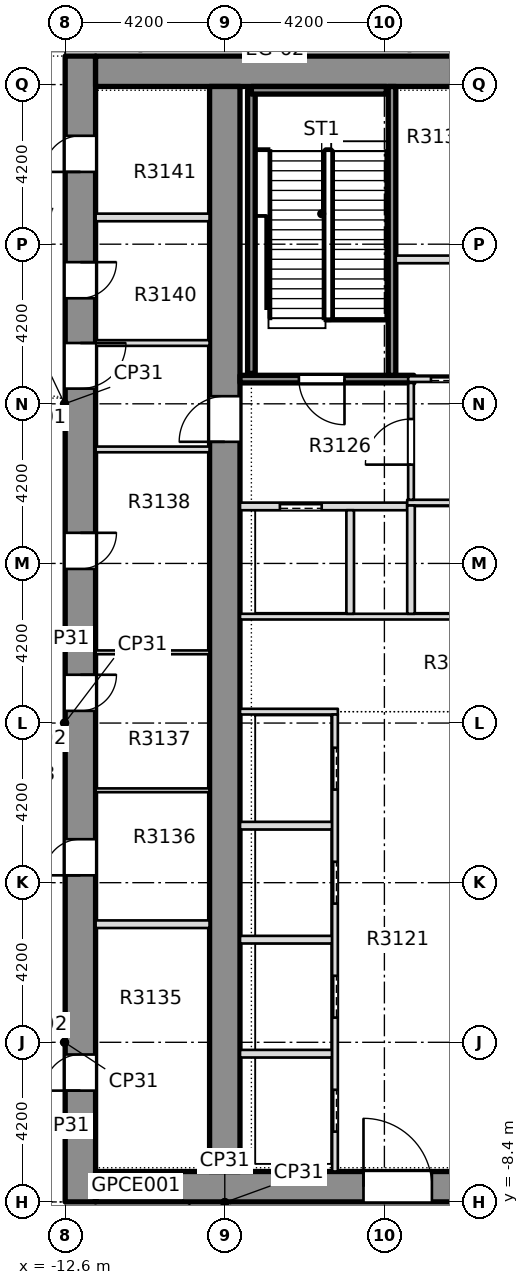
"""IFC4 building model, lengths in metres.
Left out: names, types, materials, properties, quantities, classifications, styles, units other than length and angle.
Written with IfcOpenShell. Run it as: python <this file> out.ifc"""

import sys

from ifc_helpers import new_model, si_unit, direction, frame, frame_2d, origin, place, context, subcontext, project, spatial, rectangle, extrude, element, fill, save


model = new_model("IFC4")
c1 = context("Model", 3, precision=1e-05, world=origin(), true_north=direction((0.0, 1.0)))
c2 = subcontext(c1, "Body", "Model", "MODEL_VIEW")
j1 = project(units=[si_unit("LENGTHUNIT", "METRE"), si_unit("PLANEANGLEUNIT", "RADIAN")], contexts=[c1])
p1 = place(None, origin())
s1 = spatial("IfcSite", under=j1, at=p1, CompositionType="ELEMENT")
p2 = place(p1, origin())
s2 = spatial("IfcBuilding", under=s1, at=p2, CompositionType="ELEMENT")
p3 = place(p2, frame((0.0, 0.0, 121.8)))
s3 = spatial("IfcBuildingStorey", under=s2, at=p3, CompositionType="ELEMENT", Elevation=121.8)
p4 = place(p3, frame((-12.2, -8.4, 0.0), z_axis=(0.0, 0.0, 1.0), x_axis=(0.0, 1.0, 0.0)))
e1 = element("IfcWall", 1, at=p4, inside=s3, PredefinedType="SHEAR", context=c2, shape_type="SweptSolid", body=[
    extrude(rectangle(XDim=30.15, YDim=0.8, at=frame_2d((15.075, 0.0))), origin(), (0.0, 0.0, 1.0), 6.1),
])
p5 = place(p4, frame((2.928, 0.0, 0.0)))
e2 = element("IfcOpeningElement", 2, at=p5, cuts=e1, PredefinedType="OPENING", context=c2, shape_type="SweptSolid", body=[
    extrude(rectangle(XDim=0.95, YDim=2.1, at=frame_2d((0.475, 1.05))), frame((0.0, 0.41, 0.0), z_axis=(0.0, -1.0, 0.0), x_axis=(1.0, 0.0, 0.0)), (0.0, 0.0, 1.0), 0.82),
])
p6 = place(p4, frame((8.594, 0.0, 0.0)))
e3 = element("IfcOpeningElement", 3, at=p6, cuts=e1, PredefinedType="OPENING", context=c2, shape_type="SweptSolid", body=[
    extrude(rectangle(XDim=0.95, YDim=2.1, at=frame_2d((0.475, 1.05))), frame((0.0, 0.41, 0.0), z_axis=(0.0, -1.0, 0.0), x_axis=(1.0, 0.0, 0.0)), (0.0, 0.0, 1.0), 0.82),
])
p7 = place(p4, frame((12.921, 0.0, 0.0)))
e4 = element("IfcOpeningElement", 4, at=p7, cuts=e1, PredefinedType="OPENING", context=c2, shape_type="SweptSolid", body=[
    extrude(rectangle(XDim=0.95, YDim=2.1, at=frame_2d((0.475, 1.05))), frame((0.0, 0.41, 0.0), z_axis=(0.0, -1.0, 0.0), x_axis=(1.0, 0.0, 0.0)), (0.0, 0.0, 1.0), 0.82),
])
p8 = place(p4, frame((16.656, 0.0, 0.0)))
e5 = element("IfcOpeningElement", 5, at=p8, cuts=e1, PredefinedType="OPENING", context=c2, shape_type="SweptSolid", body=[
    extrude(rectangle(XDim=0.95, YDim=2.1, at=frame_2d((0.475, 1.05))), frame((0.0, 0.41, 0.0), z_axis=(0.0, -1.0, 0.0), x_axis=(1.0, 0.0, 0.0)), (0.0, 0.0, 1.0), 0.82),
])
p9 = place(p4, frame((23.777, 0.0, 0.0)))
e6 = element("IfcOpeningElement", 6, at=p9, cuts=e1, PredefinedType="OPENING", context=c2, shape_type="SweptSolid", body=[
    extrude(rectangle(XDim=0.95, YDim=2.1, at=frame_2d((0.475, 1.05))), frame((0.0, 0.41, 0.0), z_axis=(0.0, -1.0, 0.0), x_axis=(1.0, 0.0, 0.0)), (0.0, 0.0, 1.0), 0.82),
])
p10 = place(p4, frame((27.102, 0.0, 0.0)))
e7 = element("IfcOpeningElement", 7, at=p10, cuts=e1, PredefinedType="OPENING", context=c2, shape_type="SweptSolid", body=[
    extrude(rectangle(XDim=0.95, YDim=2.1, at=frame_2d((0.475, 1.05))), frame((0.0, 0.41, 0.0), z_axis=(0.0, -1.0, 0.0), x_axis=(1.0, 0.0, 0.0)), (0.0, 0.0, 1.0), 0.82),
])
p11 = place(p4, frame((21.4, 0.0, 0.0)))
e8 = element("IfcOpeningElement", 8, at=p11, cuts=e1, PredefinedType="OPENING", context=c2, shape_type="SweptSolid", body=[
    extrude(rectangle(XDim=1.2, YDim=2.1, at=frame_2d((0.6, 1.05))), frame((0.0, 0.41, 0.0), z_axis=(0.0, -1.0, 0.0), x_axis=(1.0, 0.0, 0.0)), (0.0, 0.0, 1.0), 0.82),
])
p12 = place(p3, frame((-11.8, -8.0, 0.0), z_axis=(0.0, 0.0, 1.0), x_axis=(1.0, 0.0, 0.0)))
e9 = element("IfcWall", 9, at=p12, inside=s3, PredefinedType="SHEAR", context=c2, shape_type="SweptSolid", body=[
    extrude(rectangle(XDim=23.6, YDim=0.8, at=frame_2d((11.8, 0.0))), origin(), (0.0, 0.0, 1.0), 6.1),
])
p13 = place(p12, frame((7.05, 0.0, 0.0)))
e10 = element("IfcOpeningElement", 10, at=p13, cuts=e9, PredefinedType="OPENING", context=c2, shape_type="SweptSolid", body=[
    extrude(rectangle(XDim=1.8, YDim=2.1, at=frame_2d((0.9, 1.05))), frame((0.0, 0.41, 0.0), z_axis=(0.0, -1.0, 0.0), x_axis=(1.0, 0.0, 0.0)), (0.0, 0.0, 1.0), 0.82),
])
p14 = place(p12, frame((14.75, 0.0, 0.0)))
e11 = element("IfcOpeningElement", 11, at=p14, cuts=e9, PredefinedType="OPENING", context=c2, shape_type="SweptSolid", body=[
    extrude(rectangle(XDim=1.8, YDim=2.1, at=frame_2d((0.9, 1.05))), frame((0.0, 0.41, 0.0), z_axis=(0.0, -1.0, 0.0), x_axis=(1.0, 0.0, 0.0)), (0.0, 0.0, 1.0), 0.82),
])
p15 = place(p3, frame((-11.8, 21.35, 0.0), z_axis=(0.0, 0.0, 1.0), x_axis=(1.0, 0.0, 0.0)))
e12 = element("IfcWall", 12, at=p15, inside=s3, PredefinedType="SHEAR", context=c2, shape_type="SweptSolid", body=[
    extrude(rectangle(XDim=23.6, YDim=0.8, at=frame_2d((11.8, 0.0))), origin(), (0.0, 0.0, 1.0), 6.1),
])
p16 = place(p3, frame((-8.4, -7.6, 0.0), z_axis=(0.0, 0.0, 1.0), x_axis=(0.0, 1.0, 0.0)))
e13 = element("IfcWall", 13, at=p16, inside=s3, PredefinedType="SHEAR", context=c2, shape_type="SweptSolid", body=[
    extrude(rectangle(XDim=28.55, YDim=0.8, at=frame_2d((14.275, 0.0))), origin(), (0.0, 0.0, 1.0), 6.1),
])
p17 = place(p16, frame((19.2, 0.0, 0.0)))
e14 = element("IfcOpeningElement", 14, at=p17, cuts=e13, PredefinedType="OPENING", context=c2, shape_type="SweptSolid", body=[
    extrude(rectangle(XDim=1.2, YDim=2.1, at=frame_2d((0.6, 1.05))), frame((0.0, 0.41, 0.0), z_axis=(0.0, -1.0, 0.0), x_axis=(1.0, 0.0, 0.0)), (0.0, 0.0, 1.0), 0.82),
])
for number, where, z_axis, x_axis in (
    (15, (-7.999, -4.5, 0.0), (0.0, 0.0, 1.0), (1.0, 0.0, 0.0)),
    (16, (-7.999, -1.5, 0.0), (0.0, 0.0, 1.0), (1.0, 0.0, 0.0)),
    (17, (-7.999, 1.5, 0.0), (0.0, 0.0, 1.0), (1.0, 0.0, 0.0)),
):
    element("IfcWall", number, at=place(p3, frame(where, z_axis=z_axis, x_axis=x_axis)), inside=s3, PredefinedType="PARTITIONING", context=c2, shape_type="SweptSolid", body=[
        extrude(rectangle(XDim=2.424, YDim=0.2, at=frame_2d((1.212, 0.0))), origin(), (0.0, 0.0, 1.0), 6.1),
    ])
p18 = place(p3, frame((-7.999, 4.5, 0.0), z_axis=(0.0, 0.0, 1.0), x_axis=(1.0, 0.0, 0.0)))
e18 = element("IfcWall", 18, at=p18, inside=s3, PredefinedType="PARTITIONING", context=c2, shape_type="SweptSolid", body=[
    extrude(rectangle(XDim=2.574, YDim=0.15, at=frame_2d((1.287, 0.0))), origin(), (0.0, 0.0, 1.0), 6.1),
])
p19 = place(p3, frame((-7.999, 7.0, 0.0), z_axis=(0.0, 0.0, 1.0), x_axis=(1.0, 0.0, 0.0)))
e19 = element("IfcWall", 19, at=p19, inside=s3, PredefinedType="PARTITIONING", context=c2, shape_type="SweptSolid", body=[
    extrude(rectangle(XDim=15.998, YDim=0.15, at=frame_2d((7.999, 0.0))), origin(), (0.0, 0.0, 1.0), 6.1),
])
p20 = place(p19, frame((7.299, 0.0, 0.0)))
e20 = element("IfcOpeningElement", 20, at=p20, cuts=e19, PredefinedType="OPENING", context=c2, shape_type="SweptSolid", body=[
    extrude(rectangle(XDim=1.4, YDim=2.1, at=frame_2d((0.7, 1.05))), frame((0.0, 0.085, 0.0), z_axis=(0.0, -1.0, 0.0), x_axis=(1.0, 0.0, 0.0)), (0.0, 0.0, 1.0), 0.17),
])
p21 = place(p3, frame((-7.999, 9.9, 0.0), z_axis=(0.0, 0.0, 1.0), x_axis=(1.0, 0.0, 0.0)))
e21 = element("IfcWall", 21, at=p21, inside=s3, PredefinedType="PARTITIONING", context=c2, shape_type="SweptSolid", body=[
    extrude(rectangle(XDim=4.399, YDim=0.2, at=frame_2d((2.199, 0.0))), origin(), (0.0, 0.0, 1.0), 6.1),
])
p22 = place(p21, frame((1.049, 0.0, 0.0)))
e22 = element("IfcOpeningElement", 22, at=p22, cuts=e21, PredefinedType="OPENING", context=c2, shape_type="SweptSolid", body=[
    extrude(rectangle(XDim=1.1, YDim=2.1, at=frame_2d((0.55, 1.05))), frame((0.0, 0.11, 0.0), z_axis=(0.0, -1.0, 0.0), x_axis=(1.0, 0.0, 0.0)), (0.0, 0.0, 1.0), 0.22),
])
p23 = place(p3, frame((-3.6, 10.0, 0.0), z_axis=(0.0, 0.0, 1.0), x_axis=(1.0, 0.0, 0.0)))
e23 = element("IfcWall", 23, at=p23, inside=s3, PredefinedType="PARTITIONING", context=c2, shape_type="SweptSolid", body=[
    extrude(rectangle(XDim=7.2, YDim=0.15, at=frame_2d((3.6, 0.0))), origin(), (0.0, 0.0, 1.0), 6.1),
])
p24 = place(p23, frame((2.9, 0.0, 0.0)))
e24 = element("IfcOpeningElement", 24, at=p24, cuts=e23, PredefinedType="OPENING", context=c2, shape_type="SweptSolid", body=[
    extrude(rectangle(XDim=1.4, YDim=2.1, at=frame_2d((0.7, 1.05))), frame((0.0, 0.085, 0.0), z_axis=(0.0, -1.0, 0.0), x_axis=(1.0, 0.0, 0.0)), (0.0, 0.0, 1.0), 0.17),
])
p25 = place(p3, frame((-7.999, 13.25, 0.0), z_axis=(0.0, 0.0, 1.0), x_axis=(1.0, 0.0, 0.0)))
e25 = element("IfcWall", 25, at=p25, inside=s3, PredefinedType="SOLIDWALL", context=c2, shape_type="SweptSolid", body=[
    extrude(rectangle(XDim=4.574, YDim=0.2, at=frame_2d((2.287, 0.0))), origin(), (0.0, 0.0, 1.0), 6.1),
])
p26 = place(p25, frame((1.549, 0.0, 0.0)))
e26 = element("IfcOpeningElement", 26, at=p26, cuts=e25, PredefinedType="OPENING", context=c2, shape_type="SweptSolid", body=[
    extrude(rectangle(XDim=1.2, YDim=2.1, at=frame_2d((0.6, 1.05))), frame((0.0, 0.11, 0.0), z_axis=(0.0, -1.0, 0.0), x_axis=(1.0, 0.0, 0.0)), (0.0, 0.0, 1.0), 0.22),
])
p27 = place(p3, frame((-3.575, 13.25, 0.0), z_axis=(0.0, 0.0, 1.0), x_axis=(1.0, 0.0, 0.0)))
e27 = element("IfcWall", 27, at=p27, inside=s3, PredefinedType="PARTITIONING", context=c2, shape_type="SweptSolid", body=[
    extrude(rectangle(XDim=7.15, YDim=0.15, at=frame_2d((3.575, 0.0))), origin(), (0.0, 0.0, 1.0), 6.1),
])
p28 = place(p27, frame((0.6, 0.0, 0.0)))
e28 = element("IfcOpeningElement", 28, at=p28, cuts=e27, PredefinedType="OPENING", context=c2, shape_type="SweptSolid", body=[
    extrude(rectangle(XDim=1.2, YDim=2.1, at=frame_2d((0.6, 1.05))), frame((0.0, 0.085, 0.0), z_axis=(0.0, -1.0, 0.0), x_axis=(1.0, 0.0, 0.0)), (0.0, 0.0, 1.0), 0.17),
])
p29 = place(p27, frame((5.4, 0.0, 0.0)))
e29 = element("IfcOpeningElement", 29, at=p29, cuts=e27, PredefinedType="OPENING", context=c2, shape_type="SweptSolid", body=[
    extrude(rectangle(XDim=1.1, YDim=2.1, at=frame_2d((0.55, 1.05))), frame((0.0, 0.085, 0.0), z_axis=(0.0, -1.0, 0.0), x_axis=(1.0, 0.0, 0.0)), (0.0, 0.0, 1.0), 0.17),
])
p30 = place(p27, frame((2.975, 0.0, 0.0)))
e30 = element("IfcOpeningElement", 30, at=p30, cuts=e27, PredefinedType="OPENING", context=c2, shape_type="SweptSolid", body=[
    extrude(rectangle(XDim=1.2, YDim=2.1, at=frame_2d((0.6, 1.05))), frame((0.0, 0.085, 0.0), z_axis=(0.0, -1.0, 0.0), x_axis=(1.0, 0.0, 0.0)), (0.0, 0.0, 1.0), 0.17),
])
p31 = place(p3, frame((-3.9, 16.4, 0.0), z_axis=(0.0, 0.0, 1.0), x_axis=(1.0, 0.0, 0.0)))
e31 = element("IfcWall", 31, at=p31, inside=s3, PredefinedType="PARTITIONING", context=c2, shape_type="SweptSolid", body=[
    extrude(rectangle(XDim=3.05, YDim=0.2, at=frame_2d((1.525, 0.0))), origin(), (0.0, 0.0, 1.0), 6.1),
])
p32 = place(p3, frame((-5.5, -7.599, 0.0), z_axis=(0.0, 0.0, 1.0), x_axis=(0.0, 1.0, 0.0)))
e32 = element("IfcWall", 32, at=p32, inside=s3, PredefinedType="PARTITIONING", context=c2, shape_type="SweptSolid", body=[
    extrude(rectangle(XDim=12.024, YDim=0.15, at=frame_2d((6.012, 0.0))), origin(), (0.0, 0.0, 1.0), 6.1),
])
p33 = place(p32, frame((1.049, 0.0, 0.0)))
e33 = element("IfcOpeningElement", 33, at=p33, cuts=e32, PredefinedType="OPENING", context=c2, shape_type="SweptSolid", body=[
    extrude(rectangle(XDim=1.1, YDim=2.1, at=frame_2d((0.55, 1.05))), frame((0.0, 0.085, 0.0), z_axis=(0.0, -1.0, 0.0), x_axis=(1.0, 0.0, 0.0)), (0.0, 0.0, 1.0), 0.17),
])
p34 = place(p32, frame((4.049, 0.0, 0.0)))
e34 = element("IfcOpeningElement", 34, at=p34, cuts=e32, PredefinedType="OPENING", context=c2, shape_type="SweptSolid", body=[
    extrude(rectangle(XDim=1.1, YDim=2.1, at=frame_2d((0.55, 1.05))), frame((0.0, 0.085, 0.0), z_axis=(0.0, -1.0, 0.0), x_axis=(1.0, 0.0, 0.0)), (0.0, 0.0, 1.0), 0.17),
])
p35 = place(p32, frame((7.049, 0.0, 0.0)))
e35 = element("IfcOpeningElement", 35, at=p35, cuts=e32, PredefinedType="OPENING", context=c2, shape_type="SweptSolid", body=[
    extrude(rectangle(XDim=1.1, YDim=2.1, at=frame_2d((0.55, 1.05))), frame((0.0, 0.085, 0.0), z_axis=(0.0, -1.0, 0.0), x_axis=(1.0, 0.0, 0.0)), (0.0, 0.0, 1.0), 0.17),
])
p36 = place(p32, frame((10.049, 0.0, 0.0)))
e36 = element("IfcOpeningElement", 36, at=p36, cuts=e32, PredefinedType="OPENING", context=c2, shape_type="SweptSolid", body=[
    extrude(rectangle(XDim=1.1, YDim=2.1, at=frame_2d((0.55, 1.05))), frame((0.0, 0.085, 0.0), z_axis=(0.0, -1.0, 0.0), x_axis=(1.0, 0.0, 0.0)), (0.0, 0.0, 1.0), 0.17),
])
p37 = place(p3, frame((-5.1, 7.075, 0.0), z_axis=(0.0, 0.0, 1.0), x_axis=(0.0, 1.0, 0.0)))
e37 = element("IfcWall", 37, at=p37, inside=s3, PredefinedType="PARTITIONING", context=c2, shape_type="SweptSolid", body=[
    extrude(rectangle(XDim=2.725, YDim=0.2, at=frame_2d((1.363, 0.0))), origin(), (0.0, 0.0, 1.0), 6.1),
])
p38 = place(p3, frame((-4.0, 13.35, 0.0), z_axis=(0.0, 0.0, 1.0), x_axis=(0.0, 1.0, 0.0)))
e38 = element("IfcWall", 38, at=p38, inside=s3, PredefinedType="SOLIDWALL", context=c2, shape_type="SweptSolid", body=[
    extrude(rectangle(XDim=7.599, YDim=0.2, at=frame_2d((3.799, 0.0))), origin(), (0.0, 0.0, 1.0), 6.1),
])
p39 = place(p3, frame((-3.5, 7.075, 0.0), z_axis=(0.0, 0.0, 1.0), x_axis=(0.0, 1.0, 0.0)))
e39 = element("IfcWall", 39, at=p39, inside=s3, PredefinedType="PARTITIONING", context=c2, shape_type="SweptSolid", body=[
    extrude(rectangle(XDim=2.85, YDim=0.2, at=frame_2d((1.425, 0.0))), origin(), (0.0, 0.0, 1.0), 6.1),
])
p40 = place(p3, frame((-3.5, 10.075, 0.0), z_axis=(0.0, 0.0, 1.0), x_axis=(0.0, 1.0, 0.0)))
e40 = element("IfcWall", 40, at=p40, inside=s3, PredefinedType="PARTITIONING", context=c2, shape_type="SweptSolid", body=[
    extrude(rectangle(XDim=3.075, YDim=0.15, at=frame_2d((1.538, 0.0))), origin(), (0.0, 0.0, 1.0), 6.1),
])
p41 = place(p40, frame((0.925, 0.0, 0.0)))
e41 = element("IfcOpeningElement", 41, at=p41, cuts=e40, PredefinedType="OPENING", context=c2, shape_type="SweptSolid", body=[
    extrude(rectangle(XDim=1.2, YDim=2.1, at=frame_2d((0.6, 1.05))), frame((0.0, 0.085, 0.0), z_axis=(0.0, -1.0, 0.0), x_axis=(1.0, 0.0, 0.0)), (0.0, 0.0, 1.0), 0.17),
])
p42 = place(p3, frame((-11.799, -1.093, 0.0), z_axis=(0.0, 0.0, 1.0), x_axis=(1.0, 0.0, 0.0)))
e42 = element("IfcWall", 42, at=p42, inside=s3, PredefinedType="PARTITIONING", context=c2, shape_type="SweptSolid", body=[
    extrude(rectangle(XDim=2.998, YDim=0.2, at=frame_2d((1.499, 0.0))), origin(), (0.0, 0.0, 1.0), 6.1),
])
for number, where, z_axis, x_axis in (
    (43, (-11.799, 2.431, 0.0), (0.0, 0.0, 1.0), (1.0, 0.0, 0.0)),
    (44, (-11.799, 6.061, 0.0), (0.0, 0.0, 1.0), (1.0, 0.0, 0.0)),
):
    element("IfcWall", number, at=place(p3, frame(where, z_axis=z_axis, x_axis=x_axis)), inside=s3, PredefinedType="PARTITIONING", context=c2, shape_type="SweptSolid", body=[
        extrude(rectangle(XDim=2.998, YDim=0.1, at=frame_2d((1.499, 0.0))), origin(), (0.0, 0.0, 1.0), 6.1),
    ])
for number, where, z_axis, x_axis in (
    (45, (-11.799, 11.4, 0.0), (0.0, 0.0, 1.0), (1.0, 0.0, 0.0)),
    (46, (-11.799, 14.2, 0.0), (0.0, 0.0, 1.0), (1.0, 0.0, 0.0)),
):
    element("IfcWall", number, at=place(p3, frame(where, z_axis=z_axis, x_axis=x_axis)), inside=s3, PredefinedType="PARTITIONING", context=c2, shape_type="SweptSolid", body=[
        extrude(rectangle(XDim=2.998, YDim=0.15, at=frame_2d((1.499, 0.0))), origin(), (0.0, 0.0, 1.0), 6.1),
    ])
p43 = place(p3, frame((-11.799, 17.504, 0.0), z_axis=(0.0, 0.0, 1.0), x_axis=(1.0, 0.0, 0.0)))
e47 = element("IfcWall", 47, at=p43, inside=s3, PredefinedType="PARTITIONING", context=c2, shape_type="SweptSolid", body=[
    extrude(rectangle(XDim=2.998, YDim=0.2, at=frame_2d((1.499, 0.0))), origin(), (0.0, 0.0, 1.0), 6.1),
])
p44 = place(p3, frame((-7.7, 13.4, 0.0), z_axis=(0.0, 0.0, 1.0), x_axis=(0.0, 1.0, 0.0)))
e48 = element("IfcWall", 48, at=p44, inside=s3, PredefinedType="SOLIDWALL", context=c2, shape_type="SweptSolid", body=[
    extrude(rectangle(XDim=7.45, YDim=0.2, at=frame_2d((3.725, 0.0))), origin(), (0.0, 0.0, 1.0), 6.1),
])
p45 = place(p3, frame((-7.7, 20.85, 0.0), z_axis=(0.0, 0.0, 1.0), x_axis=(1.0, 0.0, 0.0)))
e49 = element("IfcWall", 49, at=p45, inside=s3, PredefinedType="SOLIDWALL", context=c2, shape_type="SweptSolid", body=[
    extrude(rectangle(XDim=3.55, YDim=0.2, at=frame_2d((1.775, 0.0))), origin(), (0.0, 0.0, 1.0), 6.1),
])
p46 = place(p33, origin())
e50 = element("IfcDoor", 50, at=p46, inside=s3, OperationType="SLIDING_TO_LEFT", PredefinedType="DOOR", context=c2, shape_type="SweptSolid", body=[
    extrude(rectangle(XDim=1.1, YDim=2.1, at=frame_2d((0.55, 1.05))), frame((0.0, 0.025, 0.0), z_axis=(0.0, -1.0, 0.0), x_axis=(1.0, 0.0, 0.0)), (0.0, 0.0, 1.0), 0.05),
])
fill(e33, e50)
p47 = place(p34, origin())
e51 = element("IfcDoor", 51, at=p47, inside=s3, OperationType="SLIDING_TO_LEFT", PredefinedType="DOOR", context=c2, shape_type="SweptSolid", body=[
    extrude(rectangle(XDim=1.1, YDim=2.1, at=frame_2d((0.55, 1.05))), frame((0.0, 0.025, 0.0), z_axis=(0.0, -1.0, 0.0), x_axis=(1.0, 0.0, 0.0)), (0.0, 0.0, 1.0), 0.05),
])
fill(e34, e51)
p48 = place(p35, origin())
e52 = element("IfcDoor", 52, at=p48, inside=s3, OperationType="SLIDING_TO_LEFT", PredefinedType="DOOR", context=c2, shape_type="SweptSolid", body=[
    extrude(rectangle(XDim=1.1, YDim=2.1, at=frame_2d((0.55, 1.05))), frame((0.0, 0.025, 0.0), z_axis=(0.0, -1.0, 0.0), x_axis=(1.0, 0.0, 0.0)), (0.0, 0.0, 1.0), 0.05),
])
fill(e35, e52)
p49 = place(p36, origin())
e53 = element("IfcDoor", 53, at=p49, inside=s3, OperationType="SLIDING_TO_LEFT", PredefinedType="DOOR", context=c2, shape_type="SweptSolid", body=[
    extrude(rectangle(XDim=1.1, YDim=2.1, at=frame_2d((0.55, 1.05))), frame((0.0, 0.025, 0.0), z_axis=(0.0, -1.0, 0.0), x_axis=(1.0, 0.0, 0.0)), (0.0, 0.0, 1.0), 0.05),
])
fill(e36, e53)
p50 = place(p26, origin())
e54 = element("IfcDoor", 54, at=p50, inside=s3, OperationType="SINGLE_SWING_LEFT", PredefinedType="DOOR", context=c2, shape_type="SweptSolid", body=[
    extrude(rectangle(XDim=1.2, YDim=2.1, at=frame_2d((0.6, 1.05))), frame((0.0, 0.025, 0.0), z_axis=(0.0, -1.0, 0.0), x_axis=(1.0, 0.0, 0.0)), (0.0, 0.0, 1.0), 0.05),
])
fill(e26, e54)
p51 = place(p22, origin())
e55 = element("IfcDoor", 55, at=p51, inside=s3, OperationType="SLIDING_TO_LEFT", PredefinedType="DOOR", context=c2, shape_type="SweptSolid", body=[
    extrude(rectangle(XDim=1.1, YDim=2.1, at=frame_2d((0.55, 1.05))), frame((0.0, 0.025, 0.0), z_axis=(0.0, -1.0, 0.0), x_axis=(1.0, 0.0, 0.0)), (0.0, 0.0, 1.0), 0.05),
])
fill(e22, e55)
p52 = place(p28, origin())
e56 = element("IfcDoor", 56, at=p52, inside=s3, OperationType="SLIDING_TO_RIGHT", PredefinedType="DOOR", context=c2, shape_type="SweptSolid", body=[
    extrude(rectangle(XDim=1.2, YDim=2.1, at=frame_2d((0.6, 1.05))), frame((0.0, 0.025, 0.0), z_axis=(0.0, -1.0, 0.0), x_axis=(1.0, 0.0, 0.0)), (0.0, 0.0, 1.0), 0.05),
])
fill(e28, e56)
p53 = place(p41, origin())
e57 = element("IfcDoor", 57, at=p53, inside=s3, OperationType="SINGLE_SWING_RIGHT", PredefinedType="DOOR", context=c2, shape_type="SweptSolid", body=[
    extrude(rectangle(XDim=1.2, YDim=2.1, at=frame_2d((0.6, 1.05))), frame((0.0, 0.025, 0.0), z_axis=(0.0, -1.0, 0.0), x_axis=(1.0, 0.0, 0.0)), (0.0, 0.0, 1.0), 0.05),
])
fill(e41, e57)
p54 = place(p13, origin())
e58 = element("IfcDoor", 58, at=p54, inside=s3, OperationType="SINGLE_SWING_LEFT", PredefinedType="DOOR", context=c2, shape_type="SweptSolid", body=[
    extrude(rectangle(XDim=1.8, YDim=2.1, at=frame_2d((0.9, 1.05))), frame((0.0, 0.025, 0.0), z_axis=(0.0, -1.0, 0.0), x_axis=(1.0, 0.0, 0.0)), (0.0, 0.0, 1.0), 0.05),
])
fill(e10, e58)
p55 = place(p5, origin())
e59 = element("IfcDoor", 59, at=p55, inside=s3, OperationType="SINGLE_SWING_LEFT", PredefinedType="DOOR", context=c2, shape_type="SweptSolid", body=[
    extrude(rectangle(XDim=0.95, YDim=2.1, at=frame_2d((0.475, 1.05))), frame((0.0, 0.025, 0.0), z_axis=(0.0, -1.0, 0.0), x_axis=(1.0, 0.0, 0.0)), (0.0, 0.0, 1.0), 0.05),
])
fill(e2, e59)
p56 = place(p6, origin())
e60 = element("IfcDoor", 60, at=p56, inside=s3, OperationType="SINGLE_SWING_LEFT", PredefinedType="DOOR", context=c2, shape_type="SweptSolid", body=[
    extrude(rectangle(XDim=0.95, YDim=2.1, at=frame_2d((0.475, 1.05))), frame((0.0, 0.025, 0.0), z_axis=(0.0, -1.0, 0.0), x_axis=(1.0, 0.0, 0.0)), (0.0, 0.0, 1.0), 0.05),
])
fill(e3, e60)
p57 = place(p7, origin())
e61 = element("IfcDoor", 61, at=p57, inside=s3, OperationType="SINGLE_SWING_LEFT", PredefinedType="DOOR", context=c2, shape_type="SweptSolid", body=[
    extrude(rectangle(XDim=0.95, YDim=2.1, at=frame_2d((0.475, 1.05))), frame((0.0, 0.025, 0.0), z_axis=(0.0, -1.0, 0.0), x_axis=(1.0, 0.0, 0.0)), (0.0, 0.0, 1.0), 0.05),
])
fill(e4, e61)
p58 = place(p8, origin())
e62 = element("IfcDoor", 62, at=p58, inside=s3, OperationType="SINGLE_SWING_LEFT", PredefinedType="DOOR", context=c2, shape_type="SweptSolid", body=[
    extrude(rectangle(XDim=0.95, YDim=2.1, at=frame_2d((0.475, 1.05))), frame((0.0, 0.025, 0.0), z_axis=(0.0, -1.0, 0.0), x_axis=(1.0, 0.0, 0.0)), (0.0, 0.0, 1.0), 0.05),
])
fill(e5, e62)
p59 = place(p9, origin())
e63 = element("IfcDoor", 63, at=p59, inside=s3, OperationType="SINGLE_SWING_LEFT", PredefinedType="DOOR", context=c2, shape_type="SweptSolid", body=[
    extrude(rectangle(XDim=0.95, YDim=2.1, at=frame_2d((0.475, 1.05))), frame((0.0, 0.025, 0.0), z_axis=(0.0, -1.0, 0.0), x_axis=(1.0, 0.0, 0.0)), (0.0, 0.0, 1.0), 0.05),
])
fill(e6, e63)
p60 = place(p10, origin())
e64 = element("IfcDoor", 64, at=p60, inside=s3, OperationType="SINGLE_SWING_LEFT", PredefinedType="DOOR", context=c2, shape_type="SweptSolid", body=[
    extrude(rectangle(XDim=0.95, YDim=2.1, at=frame_2d((0.475, 1.05))), frame((0.0, 0.025, 0.0), z_axis=(0.0, -1.0, 0.0), x_axis=(1.0, 0.0, 0.0)), (0.0, 0.0, 1.0), 0.05),
])
fill(e7, e64)
p61 = place(p11, origin())
e65 = element("IfcDoor", 65, at=p61, inside=s3, OperationType="SINGLE_SWING_LEFT", PredefinedType="DOOR", context=c2, shape_type="SweptSolid", body=[
    extrude(rectangle(XDim=1.2, YDim=2.1, at=frame_2d((0.6, 1.05))), frame((0.0, 0.025, 0.0), z_axis=(0.0, -1.0, 0.0), x_axis=(1.0, 0.0, 0.0)), (0.0, 0.0, 1.0), 0.05),
])
fill(e8, e65)
p62 = place(p17, origin())
e66 = element("IfcDoor", 66, at=p62, inside=s3, OperationType="SINGLE_SWING_LEFT", PredefinedType="DOOR", context=c2, shape_type="SweptSolid", body=[
    extrude(rectangle(XDim=1.2, YDim=2.1, at=frame_2d((0.6, 1.05))), frame((0.0, 0.025, 0.0), z_axis=(0.0, -1.0, 0.0), x_axis=(1.0, 0.0, 0.0)), (0.0, 0.0, 1.0), 0.05),
])
fill(e14, e66)
save(model, sys.argv[1])
